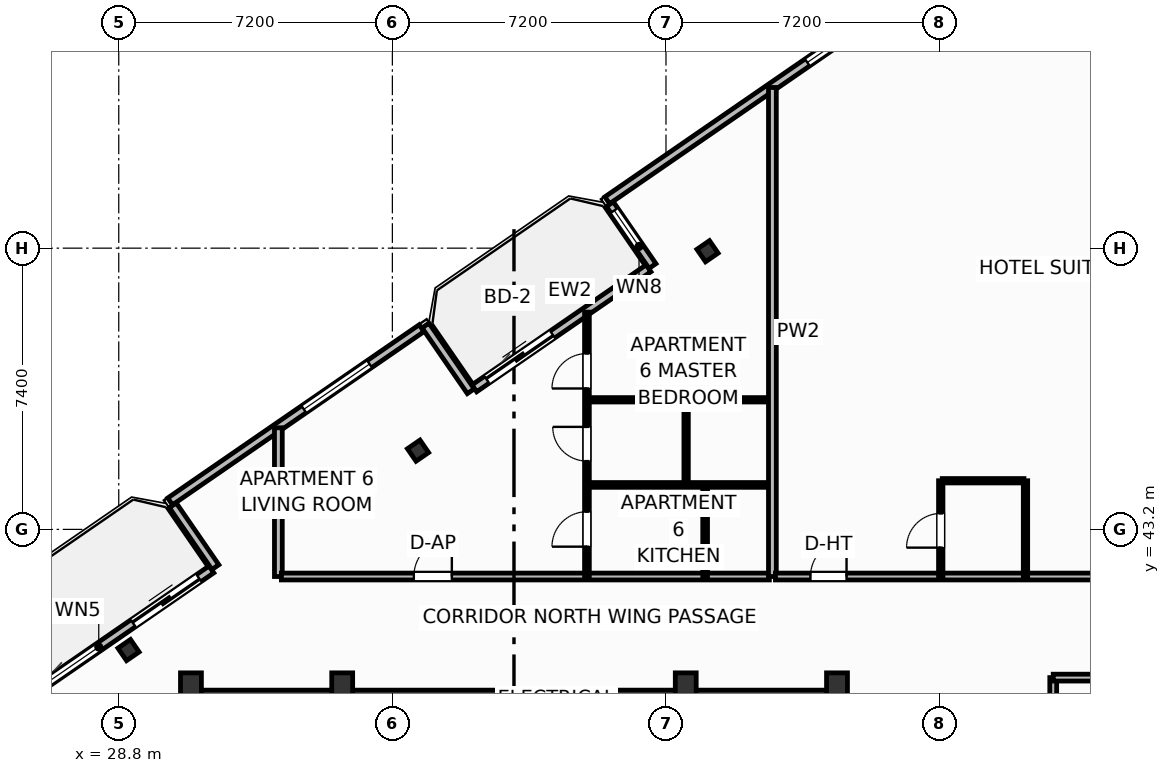
"""IFC4 building model, lengths in metres.
Left out: names, types, materials, properties, quantities, classifications, styles, units other than length and angle.
Written with IfcOpenShell. Run it as: python <this file> out.ifc"""

import sys

from ifc_helpers import new_model, si_unit, direction, frame, frame_2d, origin, origin_2d, place, context, subcontext, project, spatial, rectangle, i_section, extrude, element, fill, save


model = new_model("IFC4")
c1 = context("Model", 3, precision=1e-05, world=origin(), true_north=direction((0.0, 1.0)))
c2 = subcontext(c1, "Body", "Model", "MODEL_VIEW")
j1 = project(units=[si_unit("LENGTHUNIT", "METRE"), si_unit("PLANEANGLEUNIT", "RADIAN")], contexts=[c1])
p1 = place(None, origin())
s1 = spatial("IfcSite", under=j1, at=p1, CompositionType="ELEMENT")
p2 = place(p1, origin())
s2 = spatial("IfcBuilding", under=s1, at=p2, CompositionType="ELEMENT")
p3 = place(p2, frame((0.0, 0.0, 276.7)))
s3 = spatial("IfcBuildingStorey", under=s2, at=p3, CompositionType="ELEMENT", Elevation=276.7)
for number, where, z_axis, x_axis in (
    (1, (30.7, 39.05, 0.0), (0.0, 0.0, 1.0), (1.0, 0.0, 0.0)),
    (2, (34.68, 39.05, 0.0), (0.0, 0.0, 1.0), (1.0, 0.0, 0.0)),
    (3, (43.72, 39.05, 0.0), (0.0, 0.0, 1.0), (1.0, 0.0, 0.0)),
    (4, (47.7, 39.05, 0.0), (0.0, 0.0, 1.0), (1.0, 0.0, 0.0)),
):
    element("IfcColumn", number, at=place(p3, frame(where, z_axis=z_axis, x_axis=x_axis)), inside=s3, PredefinedType="COLUMN", context=c2, shape_type="SweptSolid", body=[
        extrude(rectangle(XDim=0.55, YDim=0.75, at=origin_2d()), origin(), (0.0, 0.0, 1.0), 3.7),
    ])
p4 = place(p3, frame((30.58, 38.695, 0.0), z_axis=(0.0, 0.0, 1.0), x_axis=(1.0, 0.0, 0.0)))
e5 = element("IfcWall", 5, at=p4, inside=s3, PredefinedType="SHEAR", context=c2, shape_type="SweptSolid", body=[
    extrude(rectangle(XDim=17.24, YDim=0.55, at=frame_2d((8.62, 0.0))), origin(), (0.0, 0.0, 1.0), 3.45),
])
for number, where, z_axis, x_axis in (
    (6, (44.292, 50.519, 0.0), (0.0, 0.0, 1.0), (0.824, 0.567, 0.0)),
    (7, (36.675, 45.272, 0.0), (0.0, 0.0, 1.0), (0.824, 0.567, 0.0)),
    (8, (29.057, 40.025, 0.0), (0.0, 0.0, 1.0), (0.824, 0.567, 0.0)),
):
    element("IfcColumn", number, at=place(p3, frame(where, z_axis=z_axis, x_axis=x_axis)), inside=s3, PredefinedType="COLUMN", context=c2, shape_type="SweptSolid", body=[
        extrude(i_section(OverallWidth=0.401, OverallDepth=0.399, WebThickness=0.025, FlangeThickness=0.04, FilletRadius=0.022, at=origin_2d()), origin(), (0.0, 0.0, 1.0), 3.7),
    ])
p5 = place(p3, frame((26.297, 38.743, 0.0), z_axis=(0.0, 0.0, 1.0), x_axis=(0.823534636215, 0.567265989598, 0.0)))
e9 = element("IfcWall", 9, at=p5, inside=s3, PredefinedType="SOLIDWALL", context=c2, shape_type="SweptSolid", body=[
    extrude(rectangle(XDim=6.0, YDim=0.22, at=frame_2d((3.0, 0.0))), origin(), (0.0, 0.0, 1.0), 2.73),
])
p6 = place(p5, frame((3.5, 0.0, 0.0)))
e10 = element("IfcOpeningElement", 10, at=p6, cuts=e9, PredefinedType="OPENING", context=c2, shape_type="SweptSolid", body=[
    extrude(rectangle(XDim=2.1, YDim=2.3, at=frame_2d((1.05, 1.15))), frame((0.0, 0.12, 0.0), z_axis=(0.0, -1.0, 0.0), x_axis=(1.0, 0.0, 0.0)), (0.0, 0.0, 1.0), 0.24),
])
p7 = place(p5, frame((0.55, 0.0, 0.75)))
e11 = element("IfcOpeningElement", 11, at=p7, cuts=e9, PredefinedType="OPENING", context=c2, shape_type="SweptSolid", body=[
    extrude(rectangle(XDim=1.85, YDim=1.75, at=frame_2d((0.925, 0.875))), frame((0.0, 0.12, 0.0), z_axis=(0.0, -1.0, 0.0), x_axis=(1.0, 0.0, 0.0)), (0.0, 0.0, 1.0), 0.24),
])
p8 = place(p3, frame((38.156, 46.912, 0.0), z_axis=(0.0, 0.0, 1.0), x_axis=(0.823527178548, 0.567276816195, 0.0)))
e12 = element("IfcWall", 12, at=p8, inside=s3, PredefinedType="SOLIDWALL", context=c2, shape_type="SweptSolid", body=[
    extrude(rectangle(XDim=5.567, YDim=0.22, at=frame_2d((2.783, 0.0))), origin(), (0.0, 0.0, 1.0), 2.73),
])
p9 = place(p8, frame((0.4, 0.0, 0.0)))
e13 = element("IfcOpeningElement", 13, at=p9, cuts=e12, PredefinedType="OPENING", context=c2, shape_type="SweptSolid", body=[
    extrude(rectangle(XDim=2.1, YDim=2.3, at=frame_2d((1.05, 1.15))), frame((0.0, 0.12, 0.0), z_axis=(0.0, -1.0, 0.0), x_axis=(1.0, 0.0, 0.0)), (0.0, 0.0, 1.0), 0.24),
])
p10 = place(p3, frame((50.697, 58.087, 0.0), z_axis=(0.0, 0.0, 1.0), x_axis=(-0.823539455464, -0.567258993137, 0.0)))
e14 = element("IfcWall", 14, at=p10, inside=s3, PredefinedType="SOLIDWALL", context=c2, shape_type="SweptSolid", body=[
    extrude(rectangle(XDim=10.98, YDim=0.22, at=frame_2d((5.49, 0.0))), origin(), (0.0, 0.0, 1.0), 2.73),
])
p11 = place(p10, frame((2.486, 0.0, 0.8)))
e15 = element("IfcOpeningElement", 15, at=p11, cuts=e14, PredefinedType="OPENING", context=c2, shape_type="SweptSolid", body=[
    extrude(rectangle(XDim=2.1, YDim=1.75, at=frame_2d((1.05, 0.875))), frame((0.0, 0.12, 0.0), z_axis=(0.0, -1.0, 0.0), x_axis=(1.0, 0.0, 0.0)), (0.0, 0.0, 1.0), 0.24),
])
p12 = place(p3, frame((41.725, 51.756, 0.0), z_axis=(0.0, 0.0, 1.0), x_axis=(0.567273565974, -0.823529417415, 0.0)))
e16 = element("IfcWall", 16, at=p12, inside=s3, PredefinedType="SOLIDWALL", context=c2, shape_type="SweptSolid", body=[
    extrude(rectangle(XDim=1.975, YDim=0.22, at=frame_2d((0.988, 0.0))), origin(), (0.0, 0.0, 1.0), 2.73),
])
p13 = place(p12, frame((0.2, 0.0, 0.8)))
e17 = element("IfcOpeningElement", 17, at=p13, cuts=e16, PredefinedType="OPENING", context=c2, shape_type="SweptSolid", body=[
    extrude(rectangle(XDim=1.15, YDim=1.4, at=frame_2d((0.575, 0.7))), frame((0.0, 0.12, 0.0), z_axis=(0.0, -1.0, 0.0), x_axis=(1.0, 0.0, 0.0)), (0.0, 0.0, 1.0), 0.24),
])
p14 = place(p3, frame((38.063, 46.835, 0.0), z_axis=(0.0, 0.0, 1.0), x_axis=(-0.567219383419, 0.823566737474, 0.0)))
e18 = element("IfcWall", 18, at=p14, inside=s3, PredefinedType="SOLIDWALL", context=c2, shape_type="SweptSolid", body=[
    extrude(rectangle(XDim=2.1, YDim=0.22, at=frame_2d((1.05, 0.0))), origin(), (0.0, 0.0, 1.0), 2.73),
])
p15 = place(p3, frame((36.769, 48.494, 0.0), z_axis=(0.0, 0.0, 1.0), x_axis=(-0.823521165086, -0.56728554596, 0.0)))
e19 = element("IfcWall", 19, at=p15, inside=s3, PredefinedType="SOLIDWALL", context=c2, shape_type="SweptSolid", body=[
    extrude(rectangle(XDim=8.035, YDim=0.22, at=frame_2d((4.018, 0.0))), origin(), (0.0, 0.0, 1.0), 2.73),
])
p16 = place(p15, frame((1.662, 0.0, 0.8)))
e20 = element("IfcOpeningElement", 20, at=p16, cuts=e19, PredefinedType="OPENING", context=c2, shape_type="SweptSolid", body=[
    extrude(rectangle(XDim=2.1, YDim=1.75, at=frame_2d((1.05, 0.875))), frame((0.0, 0.12, 0.0), z_axis=(0.0, -1.0, 0.0), x_axis=(1.0, 0.0, 0.0)), (0.0, 0.0, 1.0), 0.24),
])
p17 = place(p3, frame((30.223, 43.833, 0.0), z_axis=(0.0, 0.0, 1.0), x_axis=(0.567215821234, -0.823569190865, 0.0)))
e21 = element("IfcWall", 21, at=p17, inside=s3, PredefinedType="SOLIDWALL", context=c2, shape_type="SweptSolid", body=[
    extrude(rectangle(XDim=1.975, YDim=0.22, at=frame_2d((0.988, 0.0))), origin(), (0.0, 0.0, 1.0), 2.73),
])
p18 = place(p3, frame((33.0, 41.96, 0.0), z_axis=(0.0, 0.0, 1.0), x_axis=(0.0, 1.0, 0.0)))
e22 = element("IfcWall", 22, at=p18, inside=s3, PredefinedType="PARTITIONING", context=c2, shape_type="SweptSolid", body=[
    extrude(rectangle(XDim=3.914, YDim=0.205, at=frame_2d((1.957, 0.0))), origin(), (0.0, 0.0, 1.0), 3.45),
])
p19 = place(p3, frame((33.08, 41.96, 0.0), z_axis=(0.0, 0.0, 1.0), x_axis=(1.0, 0.0, 0.0)))
e23 = element("IfcWall", 23, at=p19, inside=s3, PredefinedType="PARTITIONING", context=c2, shape_type="SweptSolid", body=[
    extrude(rectangle(XDim=12.84, YDim=0.18, at=frame_2d((6.42, 0.0))), origin(), (0.0, 0.0, 1.0), 3.45),
])
p20 = place(p19, frame((3.485, 0.0, 0.0)))
e24 = element("IfcOpeningElement", 24, at=p20, cuts=e23, PredefinedType="OPENING", context=c2, shape_type="SweptSolid", body=[
    extrude(rectangle(XDim=1.0, YDim=2.2, at=frame_2d((0.5, 1.1))), frame((0.0, 0.1, 0.0), z_axis=(0.0, -1.0, 0.0), x_axis=(1.0, 0.0, 0.0)), (0.0, 0.0, 1.0), 0.2),
])
p21 = place(p3, frame((41.12, 41.96, 0.0), z_axis=(0.0, 0.0, 1.0), x_axis=(0.0, 1.0, 0.0)))
e25 = element("IfcWall", 25, at=p21, inside=s3, PredefinedType="PARTITIONING", context=c2, shape_type="SweptSolid", body=[
    extrude(rectangle(XDim=6.957, YDim=0.125, at=frame_2d((3.479, 0.0))), origin(), (0.0, 0.0, 1.0), 3.45),
])
p22 = place(p21, frame((0.785, 0.0, 0.0)))
e26 = element("IfcOpeningElement", 26, at=p22, cuts=e25, PredefinedType="OPENING", context=c2, shape_type="SweptSolid", body=[
    extrude(rectangle(XDim=0.92, YDim=2.05, at=frame_2d((0.46, 1.025))), frame((0.0, 0.073, 0.0), z_axis=(0.0, -1.0, 0.0), x_axis=(1.0, 0.0, 0.0)), (0.0, 0.0, 1.0), 0.145),
])
p23 = place(p21, frame((3.037, 0.0, 0.0)))
e27 = element("IfcOpeningElement", 27, at=p23, cuts=e25, PredefinedType="OPENING", context=c2, shape_type="SweptSolid", body=[
    extrude(rectangle(XDim=0.9, YDim=2.05, at=frame_2d((0.45, 1.025))), frame((0.0, 0.073, 0.0), z_axis=(0.0, -1.0, 0.0), x_axis=(1.0, 0.0, 0.0)), (0.0, 0.0, 1.0), 0.145),
])
p24 = place(p21, frame((4.948, 0.0, 0.0)))
e28 = element("IfcOpeningElement", 28, at=p24, cuts=e25, PredefinedType="OPENING", context=c2, shape_type="SweptSolid", body=[
    extrude(rectangle(XDim=0.92, YDim=2.05, at=frame_2d((0.46, 1.025))), frame((0.0, 0.073, 0.0), z_axis=(0.0, -1.0, 0.0), x_axis=(1.0, 0.0, 0.0)), (0.0, 0.0, 1.0), 0.145),
])
p25 = place(p3, frame((41.19, 44.37, 0.0), z_axis=(0.0, 0.0, 1.0), x_axis=(1.0, 0.0, 0.0)))
e29 = element("IfcWall", 29, at=p25, inside=s3, PredefinedType="PARTITIONING", context=c2, shape_type="SweptSolid", body=[
    extrude(rectangle(XDim=4.73, YDim=0.125, at=frame_2d((2.365, 0.0))), origin(), (0.0, 0.0, 1.0), 3.45),
])
p26 = place(p3, frame((41.19, 46.61, 0.0), z_axis=(0.0, 0.0, 1.0), x_axis=(1.0, 0.0, 0.0)))
e30 = element("IfcWall", 30, at=p26, inside=s3, PredefinedType="PARTITIONING", context=c2, shape_type="SweptSolid", body=[
    extrude(rectangle(XDim=4.73, YDim=0.115, at=frame_2d((2.365, 0.0))), origin(), (0.0, 0.0, 1.0), 3.45),
])
p27 = place(p3, frame((44.23, 41.96, 0.0), z_axis=(0.0, 0.0, 1.0), x_axis=(0.0, 1.0, 0.0)))
e31 = element("IfcWall", 31, at=p27, inside=s3, PredefinedType="PARTITIONING", context=c2, shape_type="SweptSolid", body=[
    extrude(rectangle(XDim=2.41, YDim=0.125, at=frame_2d((1.205, 0.0))), origin(), (0.0, 0.0, 1.0), 3.45),
])
p28 = place(p3, frame((43.73, 44.37, 0.0), z_axis=(0.0, 0.0, 1.0), x_axis=(0.0, 1.0, 0.0)))
e32 = element("IfcWall", 32, at=p28, inside=s3, PredefinedType="PARTITIONING", context=c2, shape_type="SweptSolid", body=[
    extrude(rectangle(XDim=2.24, YDim=0.115, at=frame_2d((1.12, 0.0))), origin(), (0.0, 0.0, 1.0), 3.45),
])
p29 = place(p3, frame((46.0, 41.96, 0.0), z_axis=(0.0, 0.0, 1.0), x_axis=(0.0, 1.0, 0.0)))
e33 = element("IfcWall", 33, at=p29, inside=s3, PredefinedType="PARTITIONING", context=c2, shape_type="SweptSolid", body=[
    extrude(rectangle(XDim=12.868, YDim=0.205, at=frame_2d((6.434, 0.0))), origin(), (0.0, 0.0, 1.0), 3.45),
])
p30 = place(p3, frame((46.08, 41.96, 0.0), z_axis=(0.0, 0.0, 1.0), x_axis=(1.0, 0.0, 0.0)))
e34 = element("IfcWall", 34, at=p30, inside=s3, PredefinedType="PARTITIONING", context=c2, shape_type="SweptSolid", body=[
    extrude(rectangle(XDim=21.627, YDim=0.18, at=frame_2d((10.813, 0.0))), origin(), (0.0, 0.0, 1.0), 3.45),
])
p31 = place(p30, frame((0.921, 0.0, 0.0)))
e35 = element("IfcOpeningElement", 35, at=p31, cuts=e34, PredefinedType="OPENING", context=c2, shape_type="SweptSolid", body=[
    extrude(rectangle(XDim=0.95, YDim=2.15, at=frame_2d((0.475, 1.075))), frame((0.0, 0.1, 0.0), z_axis=(0.0, -1.0, 0.0), x_axis=(1.0, 0.0, 0.0)), (0.0, 0.0, 1.0), 0.2),
])
p32 = place(p3, frame((50.47, 44.48, 0.0), z_axis=(0.0, 0.0, 1.0), x_axis=(1.0, 0.0, 0.0)))
e36 = element("IfcWall", 36, at=p32, inside=s3, PredefinedType="PARTITIONING", context=c2, shape_type="SweptSolid", body=[
    extrude(rectangle(XDim=2.15, YDim=0.115, at=frame_2d((1.075, 0.0))), origin(), (0.0, 0.0, 1.0), 3.45),
])
p33 = place(p3, frame((50.43, 41.96, 0.0), z_axis=(0.0, 0.0, 1.0), x_axis=(0.0, 1.0, 0.0)))
e37 = element("IfcWall", 37, at=p33, inside=s3, PredefinedType="PARTITIONING", context=c2, shape_type="SweptSolid", body=[
    extrude(rectangle(XDim=2.52, YDim=0.115, at=frame_2d((1.26, 0.0))), origin(), (0.0, 0.0, 1.0), 3.45),
])
p34 = place(p33, frame((0.76, 0.0, 0.0)))
e38 = element("IfcOpeningElement", 38, at=p34, cuts=e37, PredefinedType="OPENING", context=c2, shape_type="SweptSolid", body=[
    extrude(rectangle(XDim=0.9, YDim=2.05, at=frame_2d((0.45, 1.025))), frame((0.0, 0.067, 0.0), z_axis=(0.0, -1.0, 0.0), x_axis=(1.0, 0.0, 0.0)), (0.0, 0.0, 1.0), 0.135),
])
p35 = place(p3, frame((52.66, 41.96, 0.0), z_axis=(0.0, 0.0, 1.0), x_axis=(0.0, 1.0, 0.0)))
e39 = element("IfcWall", 39, at=p35, inside=s3, PredefinedType="PARTITIONING", context=c2, shape_type="SweptSolid", body=[
    extrude(rectangle(XDim=2.52, YDim=0.115, at=frame_2d((1.26, 0.0))), origin(), (0.0, 0.0, 1.0), 3.45),
])
p36 = place(p3, frame((53.39, 26.84, 0.0), z_axis=(0.0, 0.0, 1.0), x_axis=(0.0, 1.0, 0.0)))
e40 = element("IfcWall", 40, at=p36, inside=s3, PredefinedType="PARTITIONING", context=c2, shape_type="SweptSolid", body=[
    extrude(rectangle(XDim=12.46, YDim=0.18, at=frame_2d((6.23, 0.0))), origin(), (0.0, 0.0, 1.0), 3.45),
])
p37 = place(p36, frame((0.618, 0.0, 0.0)))
e41 = element("IfcOpeningElement", 41, at=p37, cuts=e40, PredefinedType="OPENING", context=c2, shape_type="SweptSolid", body=[
    extrude(rectangle(XDim=0.92, YDim=2.05, at=frame_2d((0.46, 1.025))), frame((0.0, 0.1, 0.0), z_axis=(0.0, -1.0, 0.0), x_axis=(1.0, 0.0, 0.0)), (0.0, 0.0, 1.0), 0.2),
])
p38 = place(p3, frame((53.39, 39.3, 0.0), z_axis=(0.0, 0.0, 1.0), x_axis=(1.0, 0.0, 0.0)))
e42 = element("IfcWall", 42, at=p38, inside=s3, PredefinedType="PARTITIONING", context=c2, shape_type="SweptSolid", body=[
    extrude(rectangle(XDim=16.149, YDim=0.18, at=frame_2d((8.075, 0.0))), origin(), (0.0, 0.0, 1.0), 2.739),
])
p39 = place(p6, origin())
e43 = element("IfcDoor", 43, at=p39, inside=s3, OperationType="SLIDING_TO_LEFT", PredefinedType="DOOR", context=c2, shape_type="SweptSolid", body=[
    extrude(rectangle(XDim=2.1, YDim=2.3, at=frame_2d((1.05, 1.15))), frame((0.0, 0.025, 0.0), z_axis=(0.0, -1.0, 0.0), x_axis=(1.0, 0.0, 0.0)), (0.0, 0.0, 1.0), 0.05),
])
fill(e10, e43)
p40 = place(p7, origin())
e44 = element("IfcWindow", 44, at=p40, inside=s3, PartitioningType="SINGLE_PANEL", PredefinedType="WINDOW", context=c2, shape_type="SweptSolid", body=[
    extrude(rectangle(XDim=1.85, YDim=1.75, at=frame_2d((0.925, 0.875))), frame((0.0, 0.03, 0.0), z_axis=(0.0, -1.0, 0.0), x_axis=(1.0, 0.0, 0.0)), (0.0, 0.0, 1.0), 0.06),
])
fill(e11, e44)
p41 = place(p9, origin())
e45 = element("IfcDoor", 45, at=p41, inside=s3, OperationType="SLIDING_TO_LEFT", PredefinedType="DOOR", context=c2, shape_type="SweptSolid", body=[
    extrude(rectangle(XDim=2.1, YDim=2.3, at=frame_2d((1.05, 1.15))), frame((0.0, 0.025, 0.0), z_axis=(0.0, -1.0, 0.0), x_axis=(1.0, 0.0, 0.0)), (0.0, 0.0, 1.0), 0.05),
])
fill(e13, e45)
p42 = place(p11, origin())
e46 = element("IfcWindow", 46, at=p42, inside=s3, PartitioningType="SINGLE_PANEL", PredefinedType="WINDOW", context=c2, shape_type="SweptSolid", body=[
    extrude(rectangle(XDim=2.1, YDim=1.75, at=frame_2d((1.05, 0.875))), frame((0.0, 0.03, 0.0), z_axis=(0.0, -1.0, 0.0), x_axis=(1.0, 0.0, 0.0)), (0.0, 0.0, 1.0), 0.06),
])
fill(e15, e46)
p43 = place(p16, origin())
e47 = element("IfcWindow", 47, at=p43, inside=s3, PartitioningType="SINGLE_PANEL", PredefinedType="WINDOW", context=c2, shape_type="SweptSolid", body=[
    extrude(rectangle(XDim=2.1, YDim=1.75, at=frame_2d((1.05, 0.875))), frame((0.0, 0.03, 0.0), z_axis=(0.0, -1.0, 0.0), x_axis=(1.0, 0.0, 0.0)), (0.0, 0.0, 1.0), 0.06),
])
fill(e20, e47)
p44 = place(p20, origin())
e48 = element("IfcDoor", 48, at=p44, inside=s3, OperationType="SINGLE_SWING_RIGHT", PredefinedType="DOOR", context=c2, shape_type="SweptSolid", body=[
    extrude(rectangle(XDim=1.0, YDim=2.2, at=frame_2d((0.5, 1.1))), frame((0.0, 0.025, 0.0), z_axis=(0.0, -1.0, 0.0), x_axis=(1.0, 0.0, 0.0)), (0.0, 0.0, 1.0), 0.05),
])
fill(e24, e48)
p45 = place(p22, origin())
e49 = element("IfcDoor", 49, at=p45, inside=s3, OperationType="SINGLE_SWING_LEFT", PredefinedType="DOOR", context=c2, shape_type="SweptSolid", body=[
    extrude(rectangle(XDim=0.92, YDim=2.05, at=frame_2d((0.46, 1.025))), frame((0.0, 0.025, 0.0), z_axis=(0.0, -1.0, 0.0), x_axis=(1.0, 0.0, 0.0)), (0.0, 0.0, 1.0), 0.05),
])
fill(e26, e49)
p46 = place(p23, origin())
e50 = element("IfcDoor", 50, at=p46, inside=s3, OperationType="SINGLE_SWING_RIGHT", PredefinedType="DOOR", context=c2, shape_type="SweptSolid", body=[
    extrude(rectangle(XDim=0.9, YDim=2.05, at=frame_2d((0.45, 1.025))), frame((0.0, 0.025, 0.0), z_axis=(0.0, -1.0, 0.0), x_axis=(1.0, 0.0, 0.0)), (0.0, 0.0, 1.0), 0.05),
])
fill(e27, e50)
p47 = place(p24, origin())
e51 = element("IfcDoor", 51, at=p47, inside=s3, OperationType="SINGLE_SWING_LEFT", PredefinedType="DOOR", context=c2, shape_type="SweptSolid", body=[
    extrude(rectangle(XDim=0.92, YDim=2.05, at=frame_2d((0.46, 1.025))), frame((0.0, 0.025, 0.0), z_axis=(0.0, -1.0, 0.0), x_axis=(1.0, 0.0, 0.0)), (0.0, 0.0, 1.0), 0.05),
])
fill(e28, e51)
p48 = place(p31, origin())
e52 = element("IfcDoor", 52, at=p48, inside=s3, OperationType="SINGLE_SWING_RIGHT", PredefinedType="DOOR", context=c2, shape_type="SweptSolid", body=[
    extrude(rectangle(XDim=0.95, YDim=2.15, at=frame_2d((0.475, 1.075))), frame((0.0, 0.025, 0.0), z_axis=(0.0, -1.0, 0.0), x_axis=(1.0, 0.0, 0.0)), (0.0, 0.0, 1.0), 0.05),
])
fill(e35, e52)
p49 = place(p34, origin())
e53 = element("IfcDoor", 53, at=p49, inside=s3, OperationType="SINGLE_SWING_LEFT", PredefinedType="DOOR", context=c2, shape_type="SweptSolid", body=[
    extrude(rectangle(XDim=0.9, YDim=2.05, at=frame_2d((0.45, 1.025))), frame((0.0, 0.025, 0.0), z_axis=(0.0, -1.0, 0.0), x_axis=(1.0, 0.0, 0.0)), (0.0, 0.0, 1.0), 0.05),
])
fill(e38, e53)
p50 = place(p13, origin())
e54 = element("IfcWindow", 54, at=p50, inside=s3, PartitioningType="SINGLE_PANEL", PredefinedType="WINDOW", context=c2, shape_type="SweptSolid", body=[
    extrude(rectangle(XDim=1.15, YDim=1.4, at=frame_2d((0.575, 0.7))), frame((0.0, 0.03, 0.0), z_axis=(0.0, -1.0, 0.0), x_axis=(1.0, 0.0, 0.0)), (0.0, 0.0, 1.0), 0.06),
])
fill(e17, e54)
save(model, sys.argv[1])
